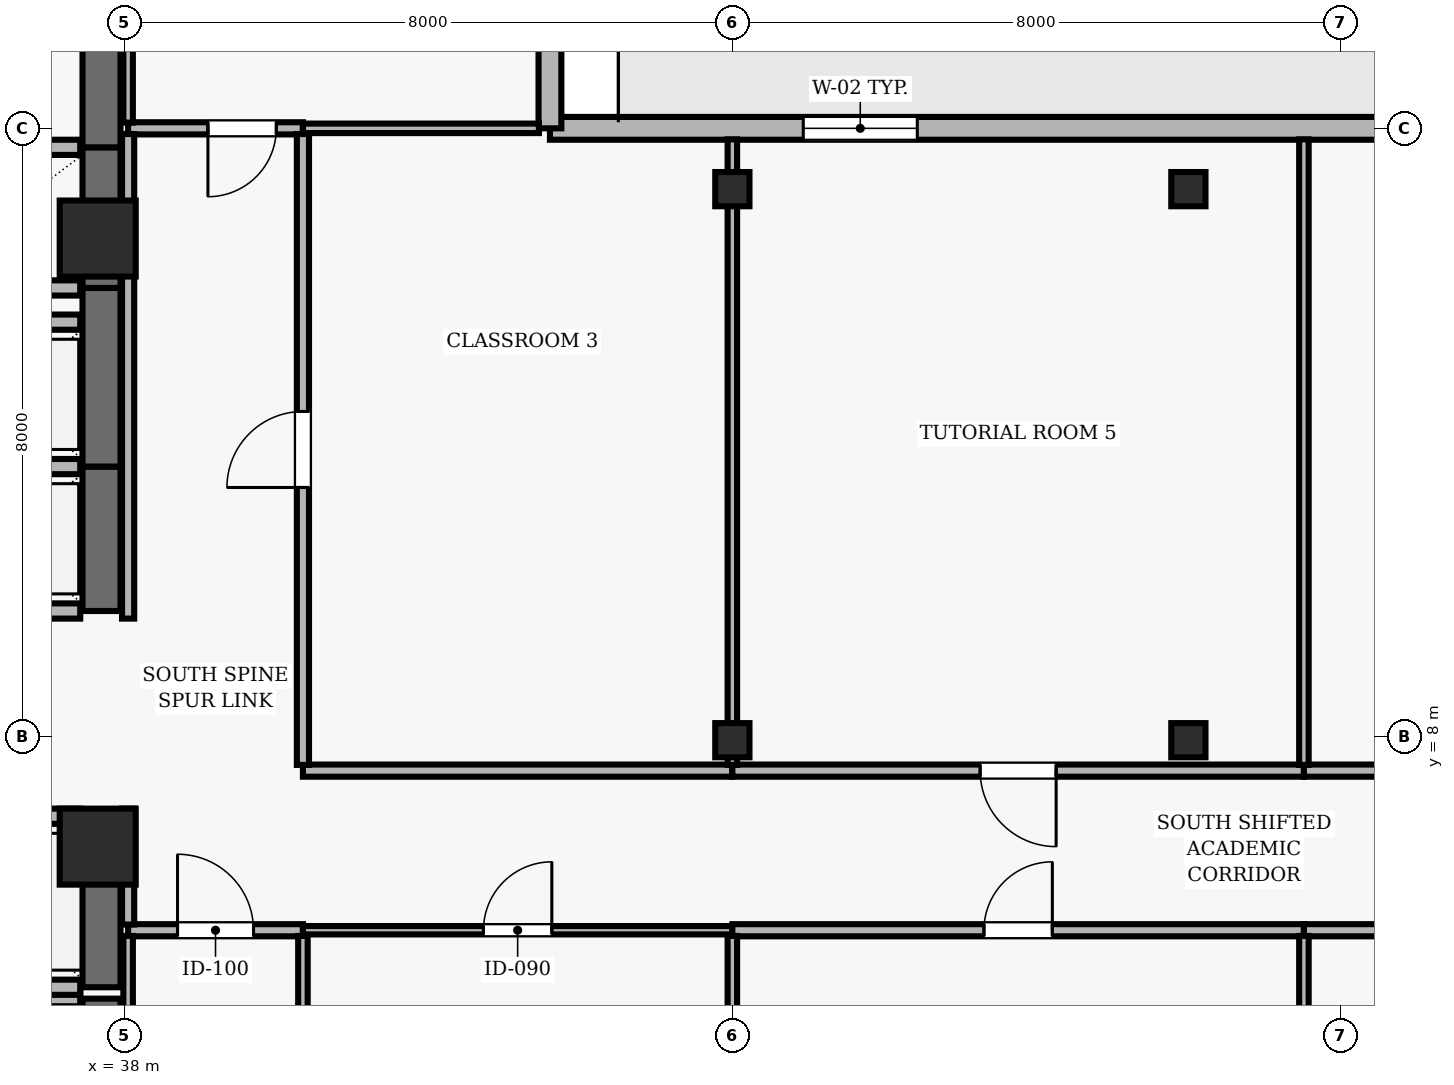
"""IFC4 building model, lengths in metres.
Left out: names, types, materials, properties, quantities, classifications, styles, units other than length and angle.
Written with IfcOpenShell. Run it as: python <this file> out.ifc"""

import sys

from ifc_helpers import new_model, si_unit, direction, frame, frame_2d, origin, origin_2d, place, context, subcontext, project, spatial, rectangle, hollow_rectangle, extrude, element, fill, save


model = new_model("IFC4")
c1 = context("Model", 3, precision=1e-05, world=origin(), true_north=direction((0.0, 1.0)))
c2 = subcontext(c1, "Body", "Model", "MODEL_VIEW")
j1 = project(units=[si_unit("LENGTHUNIT", "METRE"), si_unit("PLANEANGLEUNIT", "RADIAN")], contexts=[c1])
p1 = place(None, origin())
s1 = spatial("IfcSite", under=j1, at=p1, CompositionType="ELEMENT")
p2 = place(p1, origin())
s2 = spatial("IfcBuilding", under=s1, at=p2, CompositionType="ELEMENT")
p3 = place(p2, frame((0.0, 0.0, 234.3)))
s3 = spatial("IfcBuildingStorey", under=s2, at=p3, CompositionType="ELEMENT", Elevation=234.3)
for number, where, z_axis, x_axis in (
    (1, (37.65, 6.55, 0.0), (0.0, 0.0, 1.0), (1.0, 0.0, 0.0)),
    (2, (37.65, 14.55, 0.0), (0.0, 0.0, 1.0), (1.0, 0.0, 0.0)),
):
    element("IfcColumn", number, at=place(p3, frame(where, z_axis=z_axis, x_axis=x_axis)), inside=s3, PredefinedType="COLUMN", context=c2, shape_type="SweptSolid", body=[
        extrude(rectangle(XDim=1.0, YDim=1.0, at=origin_2d()), origin(), (0.0, 0.0, 1.0), 3.9),
    ])
for number, where, z_axis, x_axis in (
    (3, (46.0, 7.95, 0.0), (0.0, 0.0, 1.0), (1.0, 0.0, 0.0)),
    (4, (46.0, 15.2, 0.0), (0.0, 0.0, 1.0), (1.0, 0.0, 0.0)),
    (5, (52.0, 7.95, 0.0), (0.0, 0.0, 1.0), (1.0, 0.0, 0.0)),
    (6, (52.0, 15.2, 0.0), (0.0, 0.0, 1.0), (1.0, 0.0, 0.0)),
):
    element("IfcColumn", number, at=place(p3, frame(where, z_axis=z_axis, x_axis=x_axis)), inside=s3, PredefinedType="COLUMN", context=c2, shape_type="SweptSolid", body=[
        extrude(hollow_rectangle(XDim=0.45, YDim=0.45, WallThickness=0.02, at=origin_2d()), origin(), (0.0, 0.0, 1.0), 3.9),
    ])
p4 = place(p3, frame((62.7, 16.0, 0.0), z_axis=(0.0, 0.0, 1.0), x_axis=(-1.0, 0.0, 0.0)))
e7 = element("IfcWall", 7, at=p4, inside=s3, PredefinedType="SOLIDWALL", context=c2, shape_type="SweptSolid", body=[
    extrude(rectangle(XDim=19.1, YDim=0.3, at=frame_2d((9.55, 0.0))), origin(), (0.0, 0.0, 1.0), 3.64),
])
p5 = place(p4, frame((6.75, 0.0, 0.0)))
e8 = element("IfcOpeningElement", 8, at=p5, cuts=e7, PredefinedType="OPENING", context=c2, shape_type="SweptSolid", body=[
    extrude(rectangle(XDim=1.0, YDim=2.2, at=frame_2d((0.5, 1.1))), frame((0.0, 0.16, 0.0), z_axis=(0.0, -1.0, 0.0), x_axis=(1.0, 0.0, 0.0)), (0.0, 0.0, 1.0), 0.32),
])
p6 = place(p4, frame((14.267, 0.0, 0.9)))
e9 = element("IfcOpeningElement", 9, at=p6, cuts=e7, PredefinedType="OPENING", context=c2, shape_type="SweptSolid", body=[
    extrude(rectangle(XDim=1.5, YDim=1.6, at=frame_2d((0.75, 0.8))), frame((0.0, 0.16, 0.0), z_axis=(0.0, -1.0, 0.0), x_axis=(1.0, 0.0, 0.0)), (0.0, 0.0, 1.0), 0.32),
])
p7 = place(p3, frame((43.6, 16.0, 0.0), z_axis=(0.0, 0.0, 1.0), x_axis=(0.0, 1.0, 0.0)))
e10 = element("IfcWall", 10, at=p7, inside=s3, PredefinedType="SOLIDWALL", context=c2, shape_type="SweptSolid", body=[
    extrude(rectangle(XDim=5.0, YDim=0.3, at=frame_2d((2.5, 0.0))), origin(), (0.0, 0.0, 1.0), 3.64),
])
p8 = place(p3, frame((37.7, 2.45, 0.0), z_axis=(0.0, 0.0, 1.0), x_axis=(0.0, 1.0, 0.0)))
e11 = element("IfcWall", 11, at=p8, inside=s3, PredefinedType="SHEAR", context=c2, shape_type="SweptSolid", body=[
    extrude(rectangle(XDim=2.1, YDim=0.5, at=frame_2d((1.05, 0.0))), origin(), (0.0, 0.0, 1.0), 3.64),
])
p9 = place(p3, frame((37.42, 4.55, 0.0), z_axis=(0.0, 0.0, 1.0), x_axis=(-1.0, 0.0, 0.0)))
e12 = element("IfcWall", 12, at=p9, inside=s3, PredefinedType="SOLIDWALL", context=c2, shape_type="SweptSolid", body=[
    extrude(rectangle(XDim=2.14, YDim=0.2, at=frame_2d((1.07, 0.0))), origin(), (0.0, 0.0, 1.0), 3.64),
])
p10 = place(p3, frame((37.7, 4.7, 0.0), z_axis=(0.0, 0.0, 1.0), x_axis=(0.0, 1.0, 0.0)))
e13 = element("IfcWall", 13, at=p10, inside=s3, PredefinedType="SHEAR", context=c2, shape_type="SweptSolid", body=[
    extrude(rectangle(XDim=2.25, YDim=0.5, at=frame_2d((1.125, 0.0))), origin(), (0.0, 0.0, 1.0), 3.64),
])
for number, where, z_axis, x_axis in (
    (14, (35.28, 4.7, 0.0), (0.0, 0.0, 1.0), (1.0, 0.0, 0.0)),
    (15, (37.42, 6.95, 0.0), (0.0, 0.0, 1.0), (-1.0, 0.0, 0.0)),
):
    element("IfcWall", number, at=place(p3, frame(where, z_axis=z_axis, x_axis=x_axis)), inside=s3, PredefinedType="SOLIDWALL", context=c2, shape_type="SweptSolid", body=[
        extrude(rectangle(XDim=2.14, YDim=0.2, at=frame_2d((1.07, 0.0))), origin(), (0.0, 0.0, 1.0), 3.64),
    ])
p11 = place(p3, frame((37.7, 9.65, 0.0), z_axis=(0.0, 0.0, 1.0), x_axis=(0.0, 1.0, 0.0)))
e16 = element("IfcWall", 16, at=p11, inside=s3, PredefinedType="SHEAR", context=c2, shape_type="SweptSolid", body=[
    extrude(rectangle(XDim=1.9, YDim=0.5, at=frame_2d((0.95, 0.0))), origin(), (0.0, 0.0, 1.0), 3.64),
])
for number, where, z_axis, x_axis in (
    (17, (35.28, 9.65, 0.0), (0.0, 0.0, 1.0), (1.0, 0.0, 0.0)),
    (18, (37.42, 11.55, 0.0), (0.0, 0.0, 1.0), (-1.0, 0.0, 0.0)),
):
    element("IfcWall", number, at=place(p3, frame(where, z_axis=z_axis, x_axis=x_axis)), inside=s3, PredefinedType="SOLIDWALL", context=c2, shape_type="SweptSolid", body=[
        extrude(rectangle(XDim=2.14, YDim=0.2, at=frame_2d((1.07, 0.0))), origin(), (0.0, 0.0, 1.0), 3.64),
    ])
p12 = place(p3, frame((37.7, 11.55, 0.0), z_axis=(0.0, 0.0, 1.0), x_axis=(0.0, 1.0, 0.0)))
e19 = element("IfcWall", 19, at=p12, inside=s3, PredefinedType="SHEAR", context=c2, shape_type="SweptSolid", body=[
    extrude(rectangle(XDim=2.35, YDim=0.5, at=frame_2d((1.175, 0.0))), origin(), (0.0, 0.0, 1.0), 3.64),
])
p13 = place(p3, frame((37.42, 13.45, 0.0), z_axis=(0.0, 0.0, 1.0), x_axis=(-1.0, 0.0, 0.0)))
e20 = element("IfcWall", 20, at=p13, inside=s3, PredefinedType="SOLIDWALL", context=c2, shape_type="SweptSolid", body=[
    extrude(rectangle(XDim=2.14, YDim=0.2, at=frame_2d((1.07, 0.0))), origin(), (0.0, 0.0, 1.0), 3.64),
])
p14 = place(p3, frame((37.7, 13.9, 0.0), z_axis=(0.0, 0.0, 1.0), x_axis=(0.0, 1.0, 0.0)))
e21 = element("IfcWall", 21, at=p14, inside=s3, PredefinedType="SHEAR", context=c2, shape_type="SweptSolid", body=[
    extrude(rectangle(XDim=1.85, YDim=0.5, at=frame_2d((0.925, 0.0))), origin(), (0.0, 0.0, 1.0), 3.64),
])
for number, where, z_axis, x_axis in (
    (22, (35.28, 13.9, 0.0), (0.0, 0.0, 1.0), (1.0, 0.0, 0.0)),
    (23, (37.42, 15.75, 0.0), (0.0, 0.0, 1.0), (-1.0, 0.0, 0.0)),
):
    element("IfcWall", number, at=place(p3, frame(where, z_axis=z_axis, x_axis=x_axis)), inside=s3, PredefinedType="SOLIDWALL", context=c2, shape_type="SweptSolid", body=[
        extrude(rectangle(XDim=2.14, YDim=0.2, at=frame_2d((1.07, 0.0))), origin(), (0.0, 0.0, 1.0), 3.64),
    ])
p15 = place(p3, frame((37.7, 15.75, 0.0), z_axis=(0.0, 0.0, 1.0), x_axis=(0.0, 1.0, 0.0)))
e24 = element("IfcWall", 24, at=p15, inside=s3, PredefinedType="SHEAR", context=c2, shape_type="SweptSolid", body=[
    extrude(rectangle(XDim=1.85, YDim=0.5, at=frame_2d((0.925, 0.0))), origin(), (0.0, 0.0, 1.0), 3.64),
])
p16 = place(p3, frame((38.05, 5.45, 0.0), z_axis=(0.0, 0.0, 1.0), x_axis=(1.0, 0.0, 0.0)))
e25 = element("IfcWall", 25, at=p16, inside=s3, PredefinedType="PARTITIONING", context=c2, shape_type="SweptSolid", body=[
    extrude(rectangle(XDim=2.3, YDim=0.16, at=frame_2d((1.15, 0.0))), origin(), (0.0, 0.0, 1.0), 3.322),
])
p17 = place(p16, frame((0.65, 0.0, 0.0)))
e26 = element("IfcOpeningElement", 26, at=p17, cuts=e25, PredefinedType="OPENING", context=c2, shape_type="SweptSolid", body=[
    extrude(rectangle(XDim=1.0, YDim=2.1, at=frame_2d((0.5, 1.05))), frame((0.0, 0.09, 0.0), z_axis=(0.0, -1.0, 0.0), x_axis=(1.0, 0.0, 0.0)), (0.0, 0.0, 1.0), 0.18),
])
p18 = place(p3, frame((40.35, 5.45, 0.0), z_axis=(0.0, 0.0, 1.0), x_axis=(1.0, 0.0, 0.0)))
e27 = element("IfcWall", 27, at=p18, inside=s3, PredefinedType="MOVABLE", context=c2, shape_type="SweptSolid", body=[
    extrude(rectangle(XDim=5.65, YDim=0.11, at=frame_2d((2.825, 0.0))), origin(), (0.0, 0.0, 1.0), 3.322),
])
p19 = place(p18, frame((2.375, 0.0, 0.0)))
e28 = element("IfcOpeningElement", 28, at=p19, cuts=e27, PredefinedType="OPENING", context=c2, shape_type="SweptSolid", body=[
    extrude(rectangle(XDim=0.9, YDim=2.1, at=frame_2d((0.45, 1.05))), frame((0.0, 0.065, 0.0), z_axis=(0.0, -1.0, 0.0), x_axis=(1.0, 0.0, 0.0)), (0.0, 0.0, 1.0), 0.13),
])
p20 = place(p3, frame((40.35, 16.0, 0.0), z_axis=(0.0, 0.0, 1.0), x_axis=(-1.0, 0.0, 0.0)))
e29 = element("IfcWall", 29, at=p20, inside=s3, PredefinedType="PARTITIONING", context=c2, shape_type="SweptSolid", body=[
    extrude(rectangle(XDim=2.3, YDim=0.16, at=frame_2d((1.15, 0.0))), origin(), (0.0, 0.0, 1.0), 3.64),
])
p21 = place(p20, frame((0.35, 0.0, 0.0)))
e30 = element("IfcOpeningElement", 30, at=p21, cuts=e29, PredefinedType="OPENING", context=c2, shape_type="SweptSolid", body=[
    extrude(rectangle(XDim=0.9, YDim=2.1, at=frame_2d((0.45, 1.05))), frame((0.0, 0.09, 0.0), z_axis=(0.0, -1.0, 0.0), x_axis=(1.0, 0.0, 0.0)), (0.0, 0.0, 1.0), 0.18),
])
p22 = place(p3, frame((40.35, 16.0, 0.0), z_axis=(0.0, 0.0, 1.0), x_axis=(1.0, 0.0, 0.0)))
e31 = element("IfcWall", 31, at=p22, inside=s3, PredefinedType="PARTITIONING", context=c2, shape_type="SweptSolid", body=[
    extrude(rectangle(XDim=3.105, YDim=0.125, at=frame_2d((1.552, 0.0))), origin(), (0.0, 0.0, 1.0), 3.64),
])
p23 = place(p3, frame((46.0, 5.45, 0.0), z_axis=(0.0, 0.0, 1.0), x_axis=(1.0, 0.0, 0.0)))
e32 = element("IfcWall", 32, at=p23, inside=s3, PredefinedType="PARTITIONING", context=c2, shape_type="SweptSolid", body=[
    extrude(rectangle(XDim=7.52, YDim=0.16, at=frame_2d((3.76, 0.0))), origin(), (0.0, 0.0, 1.0), 3.322),
])
p24 = place(p23, frame((3.31, 0.0, 0.0)))
e33 = element("IfcOpeningElement", 33, at=p24, cuts=e32, PredefinedType="OPENING", context=c2, shape_type="SweptSolid", body=[
    extrude(rectangle(XDim=0.9, YDim=2.1, at=frame_2d((0.45, 1.05))), frame((0.0, 0.09, 0.0), z_axis=(0.0, -1.0, 0.0), x_axis=(1.0, 0.0, 0.0)), (0.0, 0.0, 1.0), 0.18),
])
p25 = place(p3, frame((46.0, 7.55, 0.0), z_axis=(0.0, 0.0, 1.0), x_axis=(-1.0, 0.0, 0.0)))
e34 = element("IfcWall", 34, at=p25, inside=s3, PredefinedType="PARTITIONING", context=c2, shape_type="SweptSolid", body=[
    extrude(rectangle(XDim=5.65, YDim=0.16, at=frame_2d((2.825, 0.0))), origin(), (0.0, 0.0, 1.0), 3.096),
])
p26 = place(p3, frame((53.52, 5.45, 0.0), z_axis=(0.0, 0.0, 1.0), x_axis=(1.0, 0.0, 0.0)))
e35 = element("IfcWall", 35, at=p26, inside=s3, PredefinedType="PARTITIONING", context=c2, shape_type="SweptSolid", body=[
    extrude(rectangle(XDim=6.21, YDim=0.16, at=frame_2d((3.105, 0.0))), origin(), (0.0, 0.0, 1.0), 3.322),
])
p27 = place(p26, frame((2.655, 0.0, 0.0)))
e36 = element("IfcOpeningElement", 36, at=p27, cuts=e35, PredefinedType="OPENING", context=c2, shape_type="SweptSolid", body=[
    extrude(rectangle(XDim=0.9, YDim=2.1, at=frame_2d((0.45, 1.05))), frame((0.0, 0.09, 0.0), z_axis=(0.0, -1.0, 0.0), x_axis=(1.0, 0.0, 0.0)), (0.0, 0.0, 1.0), 0.18),
])
p28 = place(p3, frame((53.52, 7.55, 0.0), z_axis=(0.0, 0.0, 1.0), x_axis=(-1.0, 0.0, 0.0)))
e37 = element("IfcWall", 37, at=p28, inside=s3, PredefinedType="PARTITIONING", context=c2, shape_type="SweptSolid", body=[
    extrude(rectangle(XDim=7.52, YDim=0.16, at=frame_2d((3.76, 0.0))), origin(), (0.0, 0.0, 1.0), 3.096),
])
p29 = place(p28, frame((3.26, 0.0, 0.0)))
e38 = element("IfcOpeningElement", 38, at=p29, cuts=e37, PredefinedType="OPENING", context=c2, shape_type="SweptSolid", body=[
    extrude(rectangle(XDim=1.0, YDim=2.1, at=frame_2d((0.5, 1.05))), frame((0.0, 0.09, 0.0), z_axis=(0.0, -1.0, 0.0), x_axis=(1.0, 0.0, 0.0)), (0.0, 0.0, 1.0), 0.18),
])
p30 = place(p3, frame((59.73, 7.55, 0.0), z_axis=(0.0, 0.0, 1.0), x_axis=(-1.0, 0.0, 0.0)))
e39 = element("IfcWall", 39, at=p30, inside=s3, PredefinedType="PARTITIONING", context=c2, shape_type="SweptSolid", body=[
    extrude(rectangle(XDim=6.21, YDim=0.16, at=frame_2d((3.105, 0.0))), origin(), (0.0, 0.0, 1.0), 3.096),
])
p31 = place(p30, frame((3.655, 0.0, 0.0)))
e40 = element("IfcOpeningElement", 40, at=p31, cuts=e39, PredefinedType="OPENING", context=c2, shape_type="SweptSolid", body=[
    extrude(rectangle(XDim=1.0, YDim=2.1, at=frame_2d((0.5, 1.05))), frame((0.0, 0.09, 0.0), z_axis=(0.0, -1.0, 0.0), x_axis=(1.0, 0.0, 0.0)), (0.0, 0.0, 1.0), 0.18),
])
p32 = place(p3, frame((38.05, 5.375, 0.0), z_axis=(0.0, 0.0, 1.0), x_axis=(0.0, -1.0, 0.0)))
e41 = element("IfcWall", 41, at=p32, inside=s3, PredefinedType="PARTITIONING", context=c2, shape_type="SweptSolid", body=[
    extrude(rectangle(XDim=5.23, YDim=0.125, at=frame_2d((2.615, 0.0))), origin(), (0.0, 0.0, 1.0), 3.096),
])
p33 = place(p3, frame((38.05, 7.05, 0.0), z_axis=(0.0, 0.0, 1.0), x_axis=(0.0, -1.0, 0.0)))
e42 = element("IfcWall", 42, at=p33, inside=s3, PredefinedType="PARTITIONING", context=c2, shape_type="SweptSolid", body=[
    extrude(rectangle(XDim=1.525, YDim=0.16, at=frame_2d((0.763, 0.0))), origin(), (0.0, 0.0, 1.0), 3.096),
])
p34 = place(p3, frame((38.05, 15.925, 0.0), z_axis=(0.0, 0.0, 1.0), x_axis=(0.0, -1.0, 0.0)))
e43 = element("IfcWall", 43, at=p34, inside=s3, PredefinedType="PARTITIONING", context=c2, shape_type="SweptSolid", body=[
    extrude(rectangle(XDim=6.375, YDim=0.16, at=frame_2d((3.188, 0.0))), origin(), (0.0, 0.0, 1.0), 3.096),
])
p35 = place(p3, frame((38.05, 22.055, 0.0), z_axis=(0.0, 0.0, 1.0), x_axis=(0.0, -1.0, 0.0)))
e44 = element("IfcWall", 44, at=p35, inside=s3, PredefinedType="PARTITIONING", context=c2, shape_type="SweptSolid", body=[
    extrude(rectangle(XDim=5.98, YDim=0.125, at=frame_2d((2.99, 0.0))), origin(), (0.0, 0.0, 1.0), 3.096),
])
p36 = place(p3, frame((40.35, 0.145, 0.0), z_axis=(0.0, 0.0, 1.0), x_axis=(0.0, 1.0, 0.0)))
e45 = element("IfcWall", 45, at=p36, inside=s3, PredefinedType="PARTITIONING", context=c2, shape_type="SweptSolid", body=[
    extrude(rectangle(XDim=5.23, YDim=0.125, at=frame_2d((2.615, 0.0))), origin(), (0.0, 0.0, 1.0), 3.64),
])
p37 = place(p3, frame((40.35, 7.625, 0.0), z_axis=(0.0, 0.0, 1.0), x_axis=(0.0, 1.0, 0.0)))
e46 = element("IfcWall", 46, at=p37, inside=s3, PredefinedType="PARTITIONING", context=c2, shape_type="SweptSolid", body=[
    extrude(rectangle(XDim=8.3, YDim=0.16, at=frame_2d((4.15, 0.0))), origin(), (0.0, 0.0, 1.0), 3.64),
])
p38 = place(p37, frame((3.65, 0.0, 0.0)))
e47 = element("IfcOpeningElement", 47, at=p38, cuts=e46, PredefinedType="OPENING", context=c2, shape_type="SweptSolid", body=[
    extrude(rectangle(XDim=1.0, YDim=2.1, at=frame_2d((0.5, 1.05))), frame((0.0, 0.09, 0.0), z_axis=(0.0, -1.0, 0.0), x_axis=(1.0, 0.0, 0.0)), (0.0, 0.0, 1.0), 0.18),
])
p39 = place(p3, frame((46.0, 0.145, 0.0), z_axis=(0.0, 0.0, 1.0), x_axis=(0.0, 1.0, 0.0)))
e48 = element("IfcWall", 48, at=p39, inside=s3, PredefinedType="PARTITIONING", context=c2, shape_type="SweptSolid", body=[
    extrude(rectangle(XDim=5.23, YDim=0.125, at=frame_2d((2.615, 0.0))), origin(), (0.0, 0.0, 1.0), 3.096),
])
p40 = place(p3, frame((46.0, 7.625, 0.0), z_axis=(0.0, 0.0, 1.0), x_axis=(0.0, 1.0, 0.0)))
e49 = element("IfcWall", 49, at=p40, inside=s3, PredefinedType="PARTITIONING", context=c2, shape_type="SweptSolid", body=[
    extrude(rectangle(XDim=8.23, YDim=0.125, at=frame_2d((4.115, 0.0))), origin(), (0.0, 0.0, 1.0), 3.096),
])
p41 = place(p3, frame((53.52, 0.145, 0.0), z_axis=(0.0, 0.0, 1.0), x_axis=(0.0, 1.0, 0.0)))
e50 = element("IfcWall", 50, at=p41, inside=s3, PredefinedType="PARTITIONING", context=c2, shape_type="SweptSolid", body=[
    extrude(rectangle(XDim=5.23, YDim=0.125, at=frame_2d((2.615, 0.0))), origin(), (0.0, 0.0, 1.0), 3.64),
])
p42 = place(p3, frame((53.52, 7.625, 0.0), z_axis=(0.0, 0.0, 1.0), x_axis=(0.0, 1.0, 0.0)))
e51 = element("IfcWall", 51, at=p42, inside=s3, PredefinedType="PARTITIONING", context=c2, shape_type="SweptSolid", body=[
    extrude(rectangle(XDim=8.23, YDim=0.125, at=frame_2d((4.115, 0.0))), origin(), (0.0, 0.0, 1.0), 3.64),
])
p43 = place(p6, origin())
e52 = element("IfcWindow", 52, at=p43, inside=s3, PartitioningType="SINGLE_PANEL", PredefinedType="WINDOW", context=c2, shape_type="SweptSolid", body=[
    extrude(rectangle(XDim=1.5, YDim=1.6, at=frame_2d((0.75, 0.8))), frame((0.0, 0.03, 0.0), z_axis=(0.0, -1.0, 0.0), x_axis=(1.0, 0.0, 0.0)), (0.0, 0.0, 1.0), 0.06),
])
fill(e9, e52)
p44 = place(p17, origin())
e53 = element("IfcDoor", 53, at=p44, inside=s3, OperationType="SINGLE_SWING_LEFT", PredefinedType="DOOR", context=c2, shape_type="SweptSolid", body=[
    extrude(rectangle(XDim=1.0, YDim=2.1, at=frame_2d((0.5, 1.05))), frame((0.0, 0.025, 0.0), z_axis=(0.0, -1.0, 0.0), x_axis=(1.0, 0.0, 0.0)), (0.0, 0.0, 1.0), 0.05),
])
fill(e26, e53)
p45 = place(p19, origin())
e54 = element("IfcDoor", 54, at=p45, inside=s3, OperationType="SINGLE_SWING_RIGHT", PredefinedType="DOOR", context=c2, shape_type="SweptSolid", body=[
    extrude(rectangle(XDim=0.9, YDim=2.1, at=frame_2d((0.45, 1.05))), frame((0.0, 0.025, 0.0), z_axis=(0.0, -1.0, 0.0), x_axis=(1.0, 0.0, 0.0)), (0.0, 0.0, 1.0), 0.05),
])
fill(e28, e54)
p46 = place(p38, origin())
e55 = element("IfcDoor", 55, at=p46, inside=s3, OperationType="SINGLE_SWING_LEFT", PredefinedType="DOOR", context=c2, shape_type="SweptSolid", body=[
    extrude(rectangle(XDim=1.0, YDim=2.1, at=frame_2d((0.5, 1.05))), frame((0.0, 0.025, 0.0), z_axis=(0.0, -1.0, 0.0), x_axis=(1.0, 0.0, 0.0)), (0.0, 0.0, 1.0), 0.05),
])
fill(e47, e55)
p47 = place(p24, origin())
e56 = element("IfcDoor", 56, at=p47, inside=s3, OperationType="SINGLE_SWING_RIGHT", PredefinedType="DOOR", context=c2, shape_type="SweptSolid", body=[
    extrude(rectangle(XDim=0.9, YDim=2.1, at=frame_2d((0.45, 1.05))), frame((0.0, 0.025, 0.0), z_axis=(0.0, -1.0, 0.0), x_axis=(1.0, 0.0, 0.0)), (0.0, 0.0, 1.0), 0.05),
])
fill(e33, e56)
p48 = place(p29, origin())
e57 = element("IfcDoor", 57, at=p48, inside=s3, OperationType="SINGLE_SWING_LEFT", PredefinedType="DOOR", context=c2, shape_type="SweptSolid", body=[
    extrude(rectangle(XDim=1.0, YDim=2.1, at=frame_2d((0.5, 1.05))), frame((0.0, 0.025, 0.0), z_axis=(0.0, -1.0, 0.0), x_axis=(1.0, 0.0, 0.0)), (0.0, 0.0, 1.0), 0.05),
])
fill(e38, e57)
p49 = place(p21, origin())
e58 = element("IfcDoor", 58, at=p49, inside=s3, OperationType="SINGLE_SWING_RIGHT", PredefinedType="DOOR", context=c2, shape_type="SweptSolid", body=[
    extrude(rectangle(XDim=0.9, YDim=2.1, at=frame_2d((0.45, 1.05))), frame((0.0, 0.025, 0.0), z_axis=(0.0, -1.0, 0.0), x_axis=(1.0, 0.0, 0.0)), (0.0, 0.0, 1.0), 0.05),
])
fill(e30, e58)
save(model, sys.argv[1])
